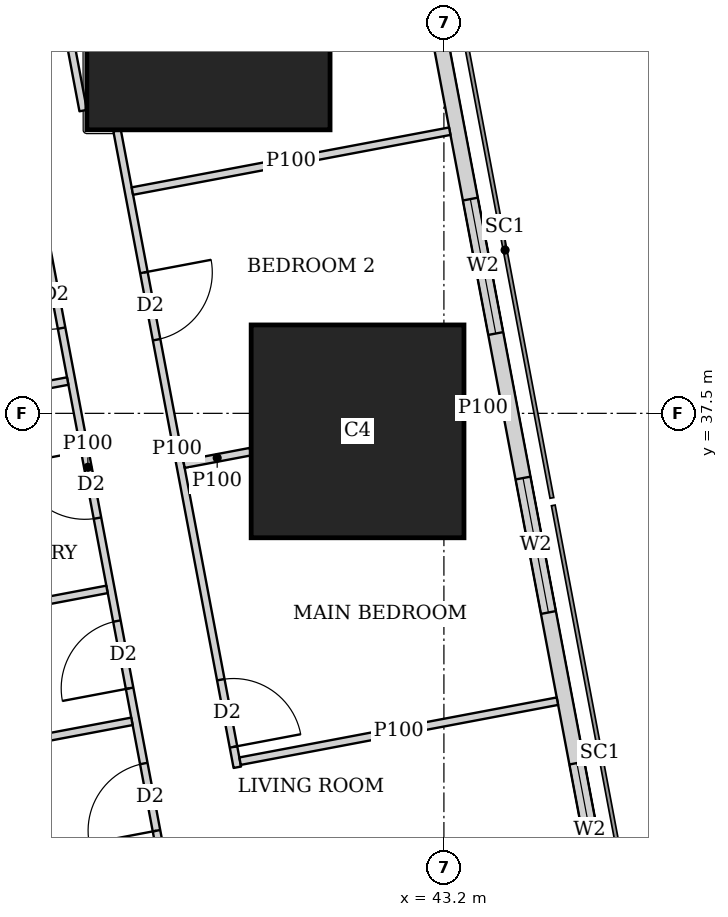
"""IFC4 building model, lengths in metres.
Left out: names, types, materials, properties, quantities, classifications, styles, units other than length and angle.
Written with IfcOpenShell. Run it as: python <this file> out.ifc"""

import sys

from ifc_helpers import new_model, si_unit, direction, frame, frame_2d, origin, origin_2d, place, context, subcontext, project, spatial, rectangle, extrude, element, fill, save


model = new_model("IFC4")
c1 = context("Model", 3, precision=1e-05, world=origin(), true_north=direction((0.0, 1.0)))
c2 = subcontext(c1, "Body", "Model", "MODEL_VIEW")
j1 = project(units=[si_unit("LENGTHUNIT", "METRE"), si_unit("PLANEANGLEUNIT", "RADIAN")], contexts=[c1])
p1 = place(None, origin())
s1 = spatial("IfcSite", under=j1, at=p1, CompositionType="ELEMENT")
p2 = place(p1, origin())
s2 = spatial("IfcBuilding", under=s1, at=p2, CompositionType="ELEMENT")
p3 = place(p2, frame((0.0, 0.0, 68.75)))
s3 = spatial("IfcBuildingStorey", under=s2, at=p3, CompositionType="ELEMENT", Elevation=68.75)
p4 = place(p3, frame((42.064, 37.263, 0.0), z_axis=(0.0, 0.0, 1.0), x_axis=(1.0, 0.0, 0.0)))
e1 = element("IfcColumn", 1, at=p4, inside=s3, PredefinedType="COLUMN", context=c2, shape_type="SweptSolid", body=[
    extrude(rectangle(XDim=2.8, YDim=2.8, at=origin_2d()), origin(), (0.0, 0.0, 1.0), 3.75),
])
p5 = place(p3, frame((40.102, 42.83, 0.0), z_axis=(0.0, 0.0, 1.0), x_axis=(1.0, 0.0, 0.0)))
e2 = element("IfcColumn", 2, at=p5, inside=s3, PredefinedType="COLUMN", context=c2, shape_type="SweptSolid", body=[
    extrude(rectangle(XDim=3.2, YDim=3.2, at=origin_2d()), origin(), (0.0, 0.0, 1.0), 3.75),
])
p6 = place(p3, frame((50.653, 2.703, 0.0), z_axis=(0.0, 0.0, 1.0), x_axis=(-0.185612026696, 0.982623109613, 0.0)))
e3 = element("IfcWall", 3, at=p6, inside=s3, PredefinedType="SOLIDWALL", context=c2, shape_type="SweptSolid", body=[
    extrude(rectangle(XDim=41.393, YDim=0.2, at=frame_2d((20.697, 0.0))), origin(), (0.0, 0.0, 1.0), 3.45),
])
p7 = place(p6, frame((1.633, 0.0, 0.9)))
e4 = element("IfcOpeningElement", 4, at=p7, cuts=e3, PredefinedType="OPENING", context=c2, shape_type="SweptSolid", body=[
    extrude(rectangle(XDim=1.8, YDim=1.5, at=frame_2d((0.9, 0.75))), frame((0.0, 0.11, 0.0), z_axis=(0.0, -1.0, 0.0), x_axis=(1.0, 0.0, 0.0)), (0.0, 0.0, 1.0), 0.22),
])
p8 = place(p6, frame((6.032, 0.0, 0.9)))
e5 = element("IfcOpeningElement", 5, at=p8, cuts=e3, PredefinedType="OPENING", context=c2, shape_type="SweptSolid", body=[
    extrude(rectangle(XDim=1.8, YDim=1.5, at=frame_2d((0.9, 0.75))), frame((0.0, 0.11, 0.0), z_axis=(0.0, -1.0, 0.0), x_axis=(1.0, 0.0, 0.0)), (0.0, 0.0, 1.0), 0.22),
])
p9 = place(p6, frame((9.848, 0.0, 0.9)))
e6 = element("IfcOpeningElement", 6, at=p9, cuts=e3, PredefinedType="OPENING", context=c2, shape_type="SweptSolid", body=[
    extrude(rectangle(XDim=1.8, YDim=1.5, at=frame_2d((0.9, 0.75))), frame((0.0, 0.11, 0.0), z_axis=(0.0, -1.0, 0.0), x_axis=(1.0, 0.0, 0.0)), (0.0, 0.0, 1.0), 0.22),
])
p10 = place(p6, frame((17.481, 0.0, 0.9)))
e7 = element("IfcOpeningElement", 7, at=p10, cuts=e3, PredefinedType="OPENING", context=c2, shape_type="SweptSolid", body=[
    extrude(rectangle(XDim=1.8, YDim=1.5, at=frame_2d((0.9, 0.75))), frame((0.0, 0.11, 0.0), z_axis=(0.0, -1.0, 0.0), x_axis=(1.0, 0.0, 0.0)), (0.0, 0.0, 1.0), 0.22),
])
p11 = place(p6, frame((21.297, 0.0, 0.9)))
e8 = element("IfcOpeningElement", 8, at=p11, cuts=e3, PredefinedType="OPENING", context=c2, shape_type="SweptSolid", body=[
    extrude(rectangle(XDim=1.8, YDim=1.5, at=frame_2d((0.9, 0.75))), frame((0.0, 0.11, 0.0), z_axis=(0.0, -1.0, 0.0), x_axis=(1.0, 0.0, 0.0)), (0.0, 0.0, 1.0), 0.22),
])
p12 = place(p6, frame((25.113, 0.0, 0.9)))
e9 = element("IfcOpeningElement", 9, at=p12, cuts=e3, PredefinedType="OPENING", context=c2, shape_type="SweptSolid", body=[
    extrude(rectangle(XDim=1.8, YDim=1.5, at=frame_2d((0.9, 0.75))), frame((0.0, 0.11, 0.0), z_axis=(0.0, -1.0, 0.0), x_axis=(1.0, 0.0, 0.0)), (0.0, 0.0, 1.0), 0.22),
])
p13 = place(p6, frame((28.93, 0.0, 0.9)))
e10 = element("IfcOpeningElement", 10, at=p13, cuts=e3, PredefinedType="OPENING", context=c2, shape_type="SweptSolid", body=[
    extrude(rectangle(XDim=1.8, YDim=1.5, at=frame_2d((0.9, 0.75))), frame((0.0, 0.11, 0.0), z_axis=(0.0, -1.0, 0.0), x_axis=(1.0, 0.0, 0.0)), (0.0, 0.0, 1.0), 0.22),
])
p14 = place(p6, frame((32.746, 0.0, 0.9)))
e11 = element("IfcOpeningElement", 11, at=p14, cuts=e3, PredefinedType="OPENING", context=c2, shape_type="SweptSolid", body=[
    extrude(rectangle(XDim=1.8, YDim=1.5, at=frame_2d((0.9, 0.75))), frame((0.0, 0.11, 0.0), z_axis=(0.0, -1.0, 0.0), x_axis=(1.0, 0.0, 0.0)), (0.0, 0.0, 1.0), 0.22),
])
p15 = place(p6, frame((36.481, 0.0, 0.9)))
e12 = element("IfcOpeningElement", 12, at=p15, cuts=e3, PredefinedType="OPENING", context=c2, shape_type="SweptSolid", body=[
    extrude(rectangle(XDim=1.8, YDim=1.5, at=frame_2d((0.9, 0.75))), frame((0.0, 0.11, 0.0), z_axis=(0.0, -1.0, 0.0), x_axis=(1.0, 0.0, 0.0)), (0.0, 0.0, 1.0), 0.22),
])
p16 = place(p3, frame((33.68, 42.723, 0.0), z_axis=(0.0, 0.0, 1.0), x_axis=(0.185624129307, -0.98262082342, 0.0)))
e13 = element("IfcWall", 13, at=p16, inside=s3, PredefinedType="SOLIDWALL", context=c2, shape_type="SweptSolid", body=[
    extrude(rectangle(XDim=41.051, YDim=0.15, at=frame_2d((20.526, 0.0))), origin(), (0.0, 0.0, 1.0), 2.45),
])
p17 = place(p16, frame((13.577, 0.0, 0.0)))
e14 = element("IfcOpeningElement", 14, at=p17, cuts=e13, PredefinedType="OPENING", context=c2, shape_type="SweptSolid", body=[
    extrude(rectangle(XDim=1.0, YDim=2.1, at=frame_2d((0.5, 1.05))), frame((0.0, 0.085, 0.0), z_axis=(0.0, -1.0, 0.0), x_axis=(1.0, 0.0, 0.0)), (0.0, 0.0, 1.0), 0.17),
])
p18 = place(p16, frame((17.394, 0.0, 0.0)))
e15 = element("IfcOpeningElement", 15, at=p18, cuts=e13, PredefinedType="OPENING", context=c2, shape_type="SweptSolid", body=[
    extrude(rectangle(XDim=1.0, YDim=2.1, at=frame_2d((0.5, 1.05))), frame((0.0, 0.085, 0.0), z_axis=(0.0, -1.0, 0.0), x_axis=(1.0, 0.0, 0.0)), (0.0, 0.0, 1.0), 0.17),
])
p19 = place(p16, frame((26.758, 0.0, 0.0)))
e16 = element("IfcOpeningElement", 16, at=p19, cuts=e13, PredefinedType="OPENING", context=c2, shape_type="SweptSolid", body=[
    extrude(rectangle(XDim=1.0, YDim=2.1, at=frame_2d((0.5, 1.05))), frame((0.0, 0.085, 0.0), z_axis=(0.0, -1.0, 0.0), x_axis=(1.0, 0.0, 0.0)), (0.0, 0.0, 1.0), 0.17),
])
p20 = place(p16, frame((32.193, 0.0, 0.0)))
e17 = element("IfcOpeningElement", 17, at=p20, cuts=e13, PredefinedType="OPENING", context=c2, shape_type="SweptSolid", body=[
    extrude(rectangle(XDim=1.0, YDim=2.1, at=frame_2d((0.5, 1.05))), frame((0.0, 0.085, 0.0), z_axis=(0.0, -1.0, 0.0), x_axis=(1.0, 0.0, 0.0)), (0.0, 0.0, 1.0), 0.17),
])
p21 = place(p3, frame((38.454, 41.483, 0.0), z_axis=(0.0, 0.0, 1.0), x_axis=(-0.185609245326, 0.982623634994, 0.0)))
e18 = element("IfcWall", 18, at=p21, inside=s3, PredefinedType="PARTITIONING", context=c2, shape_type="SweptSolid", body=[
    extrude(rectangle(XDim=4.241, YDim=0.1, at=frame_2d((2.12, 0.0))), origin(), (0.0, 0.0, 1.0), 2.0),
])
p22 = place(p3, frame((38.9, 41.22, 0.0), z_axis=(0.0, 0.0, 1.0), x_axis=(0.185595712897, -0.982626191059, 0.0)))
e19 = element("IfcWall", 19, at=p22, inside=s3, PredefinedType="PARTITIONING", context=c2, shape_type="SweptSolid", body=[
    extrude(rectangle(XDim=8.524, YDim=0.1, at=frame_2d((4.262, 0.0))), origin(), (0.0, 0.0, 1.0), 3.45),
])
p23 = place(p22, frame((7.352, 0.0, 0.0)))
e20 = element("IfcOpeningElement", 20, at=p23, cuts=e19, PredefinedType="OPENING", context=c2, shape_type="SweptSolid", body=[
    extrude(rectangle(XDim=0.9, YDim=2.1, at=frame_2d((0.45, 1.05))), frame((0.0, 0.06, 0.0), z_axis=(0.0, -1.0, 0.0), x_axis=(1.0, 0.0, 0.0)), (0.0, 0.0, 1.0), 0.12),
])
p24 = place(p22, frame((1.9, 0.0, 0.0)))
e21 = element("IfcOpeningElement", 21, at=p24, cuts=e19, PredefinedType="OPENING", context=c2, shape_type="SweptSolid", body=[
    extrude(rectangle(XDim=0.9, YDim=2.1, at=frame_2d((0.45, 1.05))), frame((0.0, 0.06, 0.0), z_axis=(0.0, -1.0, 0.0), x_axis=(1.0, 0.0, 0.0)), (0.0, 0.0, 1.0), 0.12),
])
p25 = place(p3, frame((37.515, 42.089, 0.0), z_axis=(0.0, 0.0, 1.0), x_axis=(0.185565000991, -0.982631991341, 0.0)))
e22 = element("IfcWall", 22, at=p25, inside=s3, PredefinedType="PARTITIONING", context=c2, shape_type="SweptSolid", body=[
    extrude(rectangle(XDim=10.784, YDim=0.1, at=frame_2d((5.392, 0.0))), origin(), (0.0, 0.0, 1.0), 3.45),
])
p26 = place(p25, frame((9.358, 0.0, 0.0)))
e23 = element("IfcOpeningElement", 23, at=p26, cuts=e22, PredefinedType="OPENING", context=c2, shape_type="SweptSolid", body=[
    extrude(rectangle(XDim=0.9, YDim=2.1, at=frame_2d((0.45, 1.05))), frame((0.0, 0.06, 0.0), z_axis=(0.0, -1.0, 0.0), x_axis=(1.0, 0.0, 0.0)), (0.0, 0.0, 1.0), 0.12),
])
p27 = place(p25, frame((5.173, 0.0, 0.0)))
e24 = element("IfcOpeningElement", 24, at=p27, cuts=e22, PredefinedType="OPENING", context=c2, shape_type="SweptSolid", body=[
    extrude(rectangle(XDim=0.9, YDim=2.1, at=frame_2d((0.45, 1.05))), frame((0.0, 0.06, 0.0), z_axis=(0.0, -1.0, 0.0), x_axis=(1.0, 0.0, 0.0)), (0.0, 0.0, 1.0), 0.12),
])
p28 = place(p25, frame((2.629, 0.0, 0.0)))
e25 = element("IfcOpeningElement", 25, at=p28, cuts=e22, PredefinedType="OPENING", context=c2, shape_type="SweptSolid", body=[
    extrude(rectangle(XDim=0.9, YDim=2.1, at=frame_2d((0.45, 1.05))), frame((0.0, 0.06, 0.0), z_axis=(0.0, -1.0, 0.0), x_axis=(1.0, 0.0, 0.0)), (0.0, 0.0, 1.0), 0.12),
])
p29 = place(p25, frame((7.451, 0.0, 0.0)))
e26 = element("IfcOpeningElement", 26, at=p29, cuts=e22, PredefinedType="OPENING", context=c2, shape_type="SweptSolid", body=[
    extrude(rectangle(XDim=0.9, YDim=2.1, at=frame_2d((0.45, 1.05))), frame((0.0, 0.06, 0.0), z_axis=(0.0, -1.0, 0.0), x_axis=(1.0, 0.0, 0.0)), (0.0, 0.0, 1.0), 0.12),
])
p30 = place(p3, frame((43.277, 41.212, 0.0), z_axis=(0.0, 0.0, 1.0), x_axis=(-0.982665405803, -0.185387972203, 0.0)))
e27 = element("IfcWall", 27, at=p30, inside=s3, PredefinedType="PARTITIONING", context=c2, shape_type="SweptSolid", body=[
    extrude(rectangle(XDim=4.25, YDim=0.1, at=frame_2d((2.125, 0.0))), origin(), (0.0, 0.0, 1.0), 2.0),
])
p31 = place(p3, frame((43.955, 37.62, 0.0), z_axis=(0.0, 0.0, 1.0), x_axis=(-0.982543152073, -0.186034820164, 0.0)))
e28 = element("IfcWall", 28, at=p31, inside=s3, PredefinedType="PARTITIONING", context=c2, shape_type="SweptSolid", body=[
    extrude(rectangle(XDim=0.49, YDim=0.1, at=frame_2d((0.245, 0.0))), origin(), (0.0, 0.0, 1.0), 3.45),
])
p32 = place(p3, frame((40.654, 36.996, 0.0), z_axis=(0.0, 0.0, 1.0), x_axis=(-0.982635224332, -0.185547880349, 0.0)))
e29 = element("IfcWall", 29, at=p32, inside=s3, PredefinedType="PARTITIONING", context=c2, shape_type="SweptSolid", body=[
    extrude(rectangle(XDim=0.889, YDim=0.1, at=frame_2d((0.445, 0.0))), origin(), (0.0, 0.0, 1.0), 3.45),
])
p33 = place(p3, frame((44.693, 33.713, 0.0), z_axis=(0.0, 0.0, 1.0), x_axis=(-0.982615600536, -0.185651775062, 0.0)))
e30 = element("IfcWall", 30, at=p33, inside=s3, PredefinedType="PARTITIONING", context=c2, shape_type="SweptSolid", body=[
    extrude(rectangle(XDim=4.249, YDim=0.1, at=frame_2d((2.125, 0.0))), origin(), (0.0, 0.0, 1.0), 2.0),
])
p34 = place(p3, frame((38.25, 37.925, 0.0), z_axis=(0.0, 0.0, 1.0), x_axis=(-0.982650574676, -0.185466568658, 0.0)))
e31 = element("IfcWall", 31, at=p34, inside=s3, PredefinedType="PARTITIONING", context=c2, shape_type="SweptSolid", body=[
    extrude(rectangle(XDim=1.364, YDim=0.1, at=frame_2d((0.682, 0.0))), origin(), (0.0, 0.0, 1.0), 3.45),
])
p35 = place(p3, frame((38.767, 35.184, 0.0), z_axis=(0.0, 0.0, 1.0), x_axis=(-0.982578451485, -0.185848289414, 0.0)))
e32 = element("IfcWall", 32, at=p35, inside=s3, PredefinedType="PARTITIONING", context=c2, shape_type="SweptSolid", body=[
    extrude(rectangle(XDim=3.525, YDim=0.1, at=frame_2d((1.762, 0.0))), origin(), (0.0, 0.0, 1.0), 3.45),
])
p36 = place(p3, frame((39.095, 33.448, 0.0), z_axis=(0.0, 0.0, 1.0), x_axis=(-0.982626628545, -0.185593396635, 0.0)))
e33 = element("IfcWall", 33, at=p36, inside=s3, PredefinedType="PARTITIONING", context=c2, shape_type="SweptSolid", body=[
    extrude(rectangle(XDim=3.524, YDim=0.1, at=frame_2d((1.762, 0.0))), origin(), (0.0, 0.0, 1.0), 3.45),
])
p37 = place(p13, origin())
e34 = element("IfcWindow", 34, at=p37, inside=s3, PartitioningType="SINGLE_PANEL", PredefinedType="WINDOW", context=c2, shape_type="SweptSolid", body=[
    extrude(rectangle(XDim=1.8, YDim=1.5, at=frame_2d((0.9, 0.75))), frame((0.0, 0.03, 0.0), z_axis=(0.0, -1.0, 0.0), x_axis=(1.0, 0.0, 0.0)), (0.0, 0.0, 1.0), 0.06),
])
fill(e10, e34)
p38 = place(p14, origin())
e35 = element("IfcWindow", 35, at=p38, inside=s3, PartitioningType="SINGLE_PANEL", PredefinedType="WINDOW", context=c2, shape_type="SweptSolid", body=[
    extrude(rectangle(XDim=1.8, YDim=1.5, at=frame_2d((0.9, 0.75))), frame((0.0, 0.03, 0.0), z_axis=(0.0, -1.0, 0.0), x_axis=(1.0, 0.0, 0.0)), (0.0, 0.0, 1.0), 0.06),
])
fill(e11, e35)
p39 = place(p15, origin())
e36 = element("IfcWindow", 36, at=p39, inside=s3, PartitioningType="SINGLE_PANEL", PredefinedType="WINDOW", context=c2, shape_type="SweptSolid", body=[
    extrude(rectangle(XDim=1.8, YDim=1.5, at=frame_2d((0.9, 0.75))), frame((0.0, 0.03, 0.0), z_axis=(0.0, -1.0, 0.0), x_axis=(1.0, 0.0, 0.0)), (0.0, 0.0, 1.0), 0.06),
])
fill(e12, e36)
p40 = place(p23, origin())
e37 = element("IfcDoor", 37, at=p40, inside=s3, OperationType="SINGLE_SWING_RIGHT", PredefinedType="DOOR", context=c2, shape_type="SweptSolid", body=[
    extrude(rectangle(XDim=0.9, YDim=2.1, at=frame_2d((0.45, 1.05))), frame((0.0, 0.025, 0.0), z_axis=(0.0, -1.0, 0.0), x_axis=(1.0, 0.0, 0.0)), (0.0, 0.0, 1.0), 0.05),
])
fill(e20, e37)
p41 = place(p24, origin())
e38 = element("IfcDoor", 38, at=p41, inside=s3, OperationType="SINGLE_SWING_LEFT", PredefinedType="DOOR", context=c2, shape_type="SweptSolid", body=[
    extrude(rectangle(XDim=0.9, YDim=2.1, at=frame_2d((0.45, 1.05))), frame((0.0, 0.025, 0.0), z_axis=(0.0, -1.0, 0.0), x_axis=(1.0, 0.0, 0.0)), (0.0, 0.0, 1.0), 0.05),
])
fill(e21, e38)
p42 = place(p26, origin())
e39 = element("IfcDoor", 39, at=p42, inside=s3, OperationType="SINGLE_SWING_LEFT", PredefinedType="DOOR", context=c2, shape_type="SweptSolid", body=[
    extrude(rectangle(XDim=0.9, YDim=2.1, at=frame_2d((0.45, 1.05))), frame((0.0, 0.025, 0.0), z_axis=(0.0, -1.0, 0.0), x_axis=(1.0, 0.0, 0.0)), (0.0, 0.0, 1.0), 0.05),
])
fill(e23, e39)
p43 = place(p27, origin())
e40 = element("IfcDoor", 40, at=p43, inside=s3, OperationType="SINGLE_SWING_RIGHT", PredefinedType="DOOR", context=c2, shape_type="SweptSolid", body=[
    extrude(rectangle(XDim=0.9, YDim=2.1, at=frame_2d((0.45, 1.05))), frame((0.0, 0.025, 0.0), z_axis=(0.0, -1.0, 0.0), x_axis=(1.0, 0.0, 0.0)), (0.0, 0.0, 1.0), 0.05),
])
fill(e24, e40)
p44 = place(p28, origin())
e41 = element("IfcDoor", 41, at=p44, inside=s3, OperationType="SINGLE_SWING_RIGHT", PredefinedType="DOOR", context=c2, shape_type="SweptSolid", body=[
    extrude(rectangle(XDim=0.9, YDim=2.1, at=frame_2d((0.45, 1.05))), frame((0.0, 0.025, 0.0), z_axis=(0.0, -1.0, 0.0), x_axis=(1.0, 0.0, 0.0)), (0.0, 0.0, 1.0), 0.05),
])
fill(e25, e41)
p45 = place(p29, origin())
e42 = element("IfcDoor", 42, at=p45, inside=s3, OperationType="SINGLE_SWING_LEFT", PredefinedType="DOOR", context=c2, shape_type="SweptSolid", body=[
    extrude(rectangle(XDim=0.9, YDim=2.1, at=frame_2d((0.45, 1.05))), frame((0.0, 0.025, 0.0), z_axis=(0.0, -1.0, 0.0), x_axis=(1.0, 0.0, 0.0)), (0.0, 0.0, 1.0), 0.05),
])
fill(e26, e42)
save(model, sys.argv[1])
